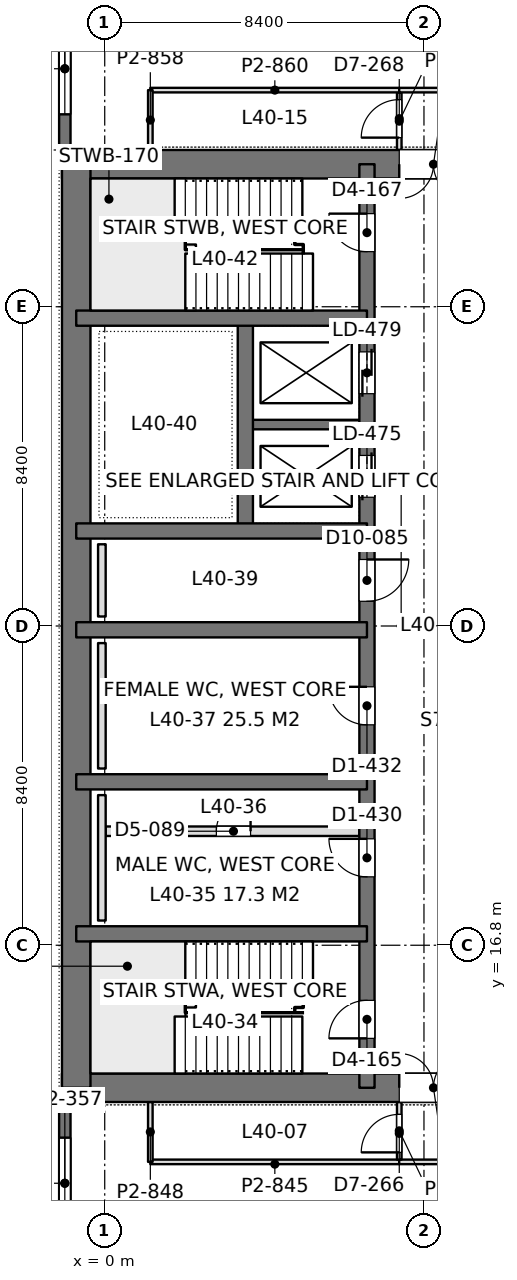
"""IFC4 building model, lengths in metres.
Left out: names, types, materials, properties, quantities, classifications, styles, units other than length and angle.
Written with IfcOpenShell. Run it as: python <this file> out.ifc"""

import sys

from ifc_helpers import new_model, si_unit, direction, frame, frame_2d, origin, place, context, subcontext, project, spatial, rectangle, extrude, element, fill, save


model = new_model("IFC4")
c1 = context("Model", 3, precision=1e-05, world=origin(), true_north=direction((0.0, 1.0)))
c2 = subcontext(c1, "Body", "Model", "MODEL_VIEW")
j1 = project(units=[si_unit("LENGTHUNIT", "METRE"), si_unit("PLANEANGLEUNIT", "RADIAN")], contexts=[c1])
p1 = place(None, origin())
s1 = spatial("IfcSite", under=j1, at=p1, CompositionType="ELEMENT")
p2 = place(p1, origin())
s2 = spatial("IfcBuilding", under=s1, at=p2, CompositionType="ELEMENT")
p3 = place(p2, frame((0.0, 0.0, 177.6)))
s3 = spatial("IfcBuildingStorey", under=s2, at=p3, CompositionType="ELEMENT", Elevation=177.6)
p4 = place(p3, frame((-1.125, 13.05, 0.0), z_axis=(0.0, 0.0, 1.0), x_axis=(1.0, 0.0, 0.0)))
e1 = element("IfcWall", 1, at=p4, inside=s3, PredefinedType="SHEAR", context=c2, shape_type="SweptSolid", body=[
    extrude(rectangle(XDim=17.85, YDim=0.75, at=frame_2d((8.925, 0.0))), origin(), (0.0, 0.0, 1.0), 4.2),
])
p5 = place(p4, frame((8.875, 0.0, 0.0)))
e2 = element("IfcOpeningElement", 2, at=p5, cuts=e1, PredefinedType="OPENING", context=c2, shape_type="SweptSolid", body=[
    extrude(rectangle(XDim=1.8, YDim=2.4, at=frame_2d((0.9, 1.2))), frame((0.0, 0.385, 0.0), z_axis=(0.0, -1.0, 0.0), x_axis=(1.0, 0.0, 0.0)), (0.0, 0.0, 1.0), 0.77),
])
p6 = place(p3, frame((-1.125, 37.35, 0.0), z_axis=(0.0, 0.0, 1.0), x_axis=(1.0, 0.0, 0.0)))
e3 = element("IfcWall", 3, at=p6, inside=s3, PredefinedType="SHEAR", context=c2, shape_type="SweptSolid", body=[
    extrude(rectangle(XDim=17.85, YDim=0.75, at=frame_2d((8.925, 0.0))), origin(), (0.0, 0.0, 1.0), 4.2),
])
p7 = place(p6, frame((8.875, 0.0, 0.0)))
e4 = element("IfcOpeningElement", 4, at=p7, cuts=e3, PredefinedType="OPENING", context=c2, shape_type="SweptSolid", body=[
    extrude(rectangle(XDim=1.8, YDim=2.4, at=frame_2d((0.9, 1.2))), frame((0.0, 0.385, 0.0), z_axis=(0.0, -1.0, 0.0), x_axis=(1.0, 0.0, 0.0)), (0.0, 0.0, 1.0), 0.77),
])
p8 = place(p3, frame((-0.75, 13.05, 0.0), z_axis=(0.0, 0.0, 1.0), x_axis=(0.0, 1.0, 0.0)))
e5 = element("IfcWall", 5, at=p8, inside=s3, PredefinedType="SHEAR", context=c2, shape_type="SweptSolid", body=[
    extrude(rectangle(XDim=24.3, YDim=0.75, at=frame_2d((12.15, 0.0))), origin(), (0.0, 0.0, 1.0), 4.2),
])
p9 = place(p3, frame((6.9, 13.05, 0.0), z_axis=(0.0, 0.0, 1.0), x_axis=(0.0, 1.0, 0.0)))
e6 = element("IfcWall", 6, at=p9, inside=s3, PredefinedType="SHEAR", context=c2, shape_type="SweptSolid", body=[
    extrude(rectangle(XDim=24.3, YDim=0.4, at=frame_2d((12.15, 0.0))), origin(), (0.0, 0.0, 1.0), 4.2),
])
p10 = place(p9, frame((1.3, 0.0, 0.0)))
e7 = element("IfcOpeningElement", 7, at=p10, cuts=e6, PredefinedType="OPENING", context=c2, shape_type="SweptSolid", body=[
    extrude(rectangle(XDim=1.0, YDim=2.2, at=frame_2d((0.5, 1.1))), frame((0.0, 0.21, 0.0), z_axis=(0.0, -1.0, 0.0), x_axis=(1.0, 0.0, 0.0)), (0.0, 0.0, 1.0), 0.42),
])
p11 = place(p9, frame((22.0, 0.0, 0.0)))
e8 = element("IfcOpeningElement", 8, at=p11, cuts=e6, PredefinedType="OPENING", context=c2, shape_type="SweptSolid", body=[
    extrude(rectangle(XDim=1.0, YDim=2.2, at=frame_2d((0.5, 1.1))), frame((0.0, 0.21, 0.0), z_axis=(0.0, -1.0, 0.0), x_axis=(1.0, 0.0, 0.0)), (0.0, 0.0, 1.0), 0.42),
])
p12 = place(p9, frame((5.55, 0.0, 0.0)))
e9 = element("IfcOpeningElement", 9, at=p12, cuts=e6, PredefinedType="OPENING", context=c2, shape_type="SweptSolid", body=[
    extrude(rectangle(XDim=1.0, YDim=2.2, at=frame_2d((0.5, 1.1))), frame((0.0, 0.21, 0.0), z_axis=(0.0, -1.0, 0.0), x_axis=(1.0, 0.0, 0.0)), (0.0, 0.0, 1.0), 0.42),
])
p13 = place(p9, frame((9.55, 0.0, 0.0)))
e10 = element("IfcOpeningElement", 10, at=p13, cuts=e6, PredefinedType="OPENING", context=c2, shape_type="SweptSolid", body=[
    extrude(rectangle(XDim=1.0, YDim=2.2, at=frame_2d((0.5, 1.1))), frame((0.0, 0.21, 0.0), z_axis=(0.0, -1.0, 0.0), x_axis=(1.0, 0.0, 0.0)), (0.0, 0.0, 1.0), 0.42),
])
p14 = place(p9, frame((12.8, 0.0, 0.0)))
e11 = element("IfcOpeningElement", 11, at=p14, cuts=e6, PredefinedType="OPENING", context=c2, shape_type="SweptSolid", body=[
    extrude(rectangle(XDim=1.1, YDim=2.2, at=frame_2d((0.55, 1.1))), frame((0.0, 0.21, 0.0), z_axis=(0.0, -1.0, 0.0), x_axis=(1.0, 0.0, 0.0)), (0.0, 0.0, 1.0), 0.42),
])
p15 = place(p9, frame((15.538, 0.0, 0.0)))
e12 = element("IfcOpeningElement", 12, at=p15, cuts=e6, PredefinedType="OPENING", context=c2, shape_type="SweptSolid", body=[
    extrude(rectangle(XDim=1.1, YDim=2.2, at=frame_2d((0.55, 1.1))), frame((0.0, 0.21, 0.0), z_axis=(0.0, -1.0, 0.0), x_axis=(1.0, 0.0, 0.0)), (0.0, 0.0, 1.0), 0.42),
])
p16 = place(p9, frame((18.262, 0.0, 0.0)))
e13 = element("IfcOpeningElement", 13, at=p16, cuts=e6, PredefinedType="OPENING", context=c2, shape_type="SweptSolid", body=[
    extrude(rectangle(XDim=1.1, YDim=2.2, at=frame_2d((0.55, 1.1))), frame((0.0, 0.21, 0.0), z_axis=(0.0, -1.0, 0.0), x_axis=(1.0, 0.0, 0.0)), (0.0, 0.0, 1.0), 0.42),
])
for number, where, z_axis, x_axis in (
    (14, (-0.75, 17.1, 0.0), (0.0, 0.0, 1.0), (1.0, 0.0, 0.0)),
    (15, (-0.75, 21.1, 0.0), (0.0, 0.0, 1.0), (1.0, 0.0, 0.0)),
    (16, (-0.75, 25.1, 0.0), (0.0, 0.0, 1.0), (1.0, 0.0, 0.0)),
    (17, (-0.75, 27.7, 0.0), (0.0, 0.0, 1.0), (1.0, 0.0, 0.0)),
    (18, (-0.75, 33.3, 0.0), (0.0, 0.0, 1.0), (1.0, 0.0, 0.0)),
):
    element("IfcWall", number, at=place(p3, frame(where, z_axis=z_axis, x_axis=x_axis)), inside=s3, PredefinedType="SHEAR", context=c2, shape_type="SweptSolid", body=[
        extrude(rectangle(XDim=7.65, YDim=0.4, at=frame_2d((3.825, 0.0))), origin(), (0.0, 0.0, 1.0), 4.2),
    ])
p17 = place(p3, frame((3.7, 27.7, 0.0), z_axis=(0.0, 0.0, 1.0), x_axis=(0.0, 1.0, 0.0)))
e19 = element("IfcWall", 19, at=p17, inside=s3, PredefinedType="SHEAR", context=c2, shape_type="SweptSolid", body=[
    extrude(rectangle(XDim=5.6, YDim=0.4, at=frame_2d((2.8, 0.0))), origin(), (0.0, 0.0, 1.0), 4.2),
])
p18 = place(p3, frame((3.7, 30.5, 0.0), z_axis=(0.0, 0.0, 1.0), x_axis=(1.0, 0.0, 0.0)))
e20 = element("IfcWall", 20, at=p18, inside=s3, PredefinedType="SHEAR", context=c2, shape_type="SweptSolid", body=[
    extrude(rectangle(XDim=3.2, YDim=0.25, at=frame_2d((1.6, 0.0))), origin(), (0.0, 0.0, 1.0), 4.2),
])
p19 = place(p3, frame((-1.05, 8.4, 0.0), z_axis=(0.0, 0.0, 1.0), x_axis=(0.0, 1.0, 0.0)))
e21 = element("IfcWall", 21, at=p19, inside=s3, PredefinedType="SOLIDWALL", context=c2, shape_type="SweptSolid", body=[
    extrude(rectangle(XDim=4.275, YDim=0.3, at=frame_2d((2.138, 0.0))), origin(), (0.0, 0.0, 1.0), 4.05),
])
p20 = place(p19, frame((0.938, 0.0, 0.9)))
e22 = element("IfcOpeningElement", 22, at=p20, cuts=e21, PredefinedType="OPENING", context=c2, shape_type="SweptSolid", body=[
    extrude(rectangle(XDim=2.4, YDim=1.9, at=frame_2d((1.2, 0.95))), frame((0.0, 0.16, 0.0), z_axis=(0.0, -1.0, 0.0), x_axis=(1.0, 0.0, 0.0)), (0.0, 0.0, 1.0), 0.32),
])
p21 = place(p3, frame((-1.05, 37.725, 0.0), z_axis=(0.0, 0.0, 1.0), x_axis=(0.0, 1.0, 0.0)))
e23 = element("IfcWall", 23, at=p21, inside=s3, PredefinedType="SOLIDWALL", context=c2, shape_type="SweptSolid", body=[
    extrude(rectangle(XDim=4.275, YDim=0.3, at=frame_2d((2.137, 0.0))), origin(), (0.0, 0.0, 1.0), 4.05),
])
p22 = place(p21, frame((0.938, 0.0, 0.9)))
e24 = element("IfcOpeningElement", 24, at=p22, cuts=e23, PredefinedType="OPENING", context=c2, shape_type="SweptSolid", body=[
    extrude(rectangle(XDim=2.4, YDim=1.9, at=frame_2d((1.2, 0.95))), frame((0.0, 0.16, 0.0), z_axis=(0.0, -1.0, 0.0), x_axis=(1.0, 0.0, 0.0)), (0.0, 0.0, 1.0), 0.32),
])
p23 = place(p3, frame((7.748, 11.1, 0.0), z_axis=(0.0, 0.0, 1.0), x_axis=(1.0, 0.0, 0.0)))
e25 = element("IfcWall", 25, at=p23, inside=s3, PredefinedType="PARTITIONING", context=c2, shape_type="SweptSolid", body=[
    extrude(rectangle(XDim=34.904, YDim=0.12, at=frame_2d((17.452, 0.0))), origin(), (0.0, 0.0, 1.0), 3.55),
])
p24 = place(p23, frame((10.735, 0.0, 0.0)))
e26 = element("IfcOpeningElement", 26, at=p24, cuts=e25, PredefinedType="OPENING", context=c2, shape_type="SweptSolid", body=[
    extrude(rectangle(XDim=1.8, YDim=2.2, at=frame_2d((0.9, 1.1))), frame((0.0, 0.07, 0.0), z_axis=(0.0, -1.0, 0.0), x_axis=(1.0, 0.0, 0.0)), (0.0, 0.0, 1.0), 0.14),
])
p25 = place(p23, frame((22.369, 0.0, 0.0)))
e27 = element("IfcOpeningElement", 27, at=p25, cuts=e25, PredefinedType="OPENING", context=c2, shape_type="SweptSolid", body=[
    extrude(rectangle(XDim=1.8, YDim=2.2, at=frame_2d((0.9, 1.1))), frame((0.0, 0.07, 0.0), z_axis=(0.0, -1.0, 0.0), x_axis=(1.0, 0.0, 0.0)), (0.0, 0.0, 1.0), 0.14),
])
p26 = place(p3, frame((7.75, 11.158, 0.0), z_axis=(0.0, 0.0, 1.0), x_axis=(0.0, 1.0, 0.0)))
e28 = element("IfcWall", 28, at=p26, inside=s3, PredefinedType="PARTITIONING", context=c2, shape_type="SweptSolid", body=[
    extrude(rectangle(XDim=1.518, YDim=0.12, at=frame_2d((0.759, 0.0))), origin(), (0.0, 0.0, 1.0), 4.05),
])
p27 = place(p26, frame((0.192, 0.0, 0.0)))
e29 = element("IfcOpeningElement", 29, at=p27, cuts=e28, PredefinedType="OPENING", context=c2, shape_type="SweptSolid", body=[
    extrude(rectangle(XDim=1.0, YDim=2.4, at=frame_2d((0.5, 1.2))), frame((0.0, 0.07, 0.0), z_axis=(0.0, -1.0, 0.0), x_axis=(1.0, 0.0, 0.0)), (0.0, 0.0, 1.0), 0.14),
])
p28 = place(p3, frame((1.2, 11.1, 0.0), z_axis=(0.0, 0.0, 1.0), x_axis=(1.0, 0.0, 0.0)))
e30 = element("IfcWall", 30, at=p28, inside=s3, PredefinedType="PARTITIONING", context=c2, shape_type="SweptSolid", body=[
    extrude(rectangle(XDim=6.552, YDim=0.12, at=frame_2d((3.276, 0.0))), origin(), (0.0, 0.0, 1.0), 4.05),
])
p29 = place(p3, frame((1.2, 11.1, 0.0), z_axis=(0.0, 0.0, 1.0), x_axis=(0.0, 1.0, 0.0)))
e31 = element("IfcWall", 31, at=p29, inside=s3, PredefinedType="PARTITIONING", context=c2, shape_type="SweptSolid", body=[
    extrude(rectangle(XDim=1.576, YDim=0.12, at=frame_2d((0.788, 0.0))), origin(), (0.0, 0.0, 1.0), 4.05),
])
p30 = place(p3, frame((7.748, 39.3, 0.0), z_axis=(0.0, 0.0, 1.0), x_axis=(1.0, 0.0, 0.0)))
e32 = element("IfcWall", 32, at=p30, inside=s3, PredefinedType="PARTITIONING", context=c2, shape_type="SweptSolid", body=[
    extrude(rectangle(XDim=34.904, YDim=0.12, at=frame_2d((17.452, 0.0))), origin(), (0.0, 0.0, 1.0), 3.55),
])
p31 = place(p30, frame((10.735, 0.0, 0.0)))
e33 = element("IfcOpeningElement", 33, at=p31, cuts=e32, PredefinedType="OPENING", context=c2, shape_type="SweptSolid", body=[
    extrude(rectangle(XDim=1.8, YDim=2.2, at=frame_2d((0.9, 1.1))), frame((0.0, 0.07, 0.0), z_axis=(0.0, -1.0, 0.0), x_axis=(1.0, 0.0, 0.0)), (0.0, 0.0, 1.0), 0.14),
])
p32 = place(p30, frame((22.369, 0.0, 0.0)))
e34 = element("IfcOpeningElement", 34, at=p32, cuts=e32, PredefinedType="OPENING", context=c2, shape_type="SweptSolid", body=[
    extrude(rectangle(XDim=1.8, YDim=2.2, at=frame_2d((0.9, 1.1))), frame((0.0, 0.07, 0.0), z_axis=(0.0, -1.0, 0.0), x_axis=(1.0, 0.0, 0.0)), (0.0, 0.0, 1.0), 0.14),
])
p33 = place(p3, frame((7.75, 37.724, 0.0), z_axis=(0.0, 0.0, 1.0), x_axis=(0.0, 1.0, 0.0)))
e35 = element("IfcWall", 35, at=p33, inside=s3, PredefinedType="PARTITIONING", context=c2, shape_type="SweptSolid", body=[
    extrude(rectangle(XDim=1.518, YDim=0.12, at=frame_2d((0.759, 0.0))), origin(), (0.0, 0.0, 1.0), 4.05),
])
p34 = place(p33, frame((0.326, 0.0, 0.0)))
e36 = element("IfcOpeningElement", 36, at=p34, cuts=e35, PredefinedType="OPENING", context=c2, shape_type="SweptSolid", body=[
    extrude(rectangle(XDim=1.0, YDim=2.4, at=frame_2d((0.5, 1.2))), frame((0.0, 0.07, 0.0), z_axis=(0.0, -1.0, 0.0), x_axis=(1.0, 0.0, 0.0)), (0.0, 0.0, 1.0), 0.14),
])
p35 = place(p3, frame((1.2, 39.3, 0.0), z_axis=(0.0, 0.0, 1.0), x_axis=(1.0, 0.0, 0.0)))
e37 = element("IfcWall", 37, at=p35, inside=s3, PredefinedType="PARTITIONING", context=c2, shape_type="SweptSolid", body=[
    extrude(rectangle(XDim=6.552, YDim=0.12, at=frame_2d((3.276, 0.0))), origin(), (0.0, 0.0, 1.0), 3.69),
])
p36 = place(p3, frame((1.2, 37.724, 0.0), z_axis=(0.0, 0.0, 1.0), x_axis=(0.0, 1.0, 0.0)))
e38 = element("IfcWall", 38, at=p36, inside=s3, PredefinedType="PARTITIONING", context=c2, shape_type="SweptSolid", body=[
    extrude(rectangle(XDim=1.576, YDim=0.12, at=frame_2d((0.788, 0.0))), origin(), (0.0, 0.0, 1.0), 4.05),
])
p37 = place(p3, frame((0.025, 19.8, 0.0), z_axis=(0.0, 0.0, 1.0), x_axis=(1.0, 0.0, 0.0)))
e39 = element("IfcWall", 39, at=p37, inside=s3, PredefinedType="PARTITIONING", context=c2, shape_type="SweptSolid", body=[
    extrude(rectangle(XDim=6.675, YDim=0.25, at=frame_2d((3.337, 0.0))), origin(), (0.0, 0.0, 1.0), 4.0),
])
p38 = place(p37, frame((2.913, 0.0, 0.0)))
e40 = element("IfcOpeningElement", 40, at=p38, cuts=e39, PredefinedType="OPENING", context=c2, shape_type="SweptSolid", body=[
    extrude(rectangle(XDim=0.9, YDim=2.2, at=frame_2d((0.45, 1.1))), frame((0.0, 0.135, 0.0), z_axis=(0.0, -1.0, 0.0), x_axis=(1.0, 0.0, 0.0)), (0.0, 0.0, 1.0), 0.27),
])
for number, where, z_axis, x_axis in (
    (41, (-0.075, 17.45, 0.0), (0.0, 0.0, 1.0), (0.0, 1.0, 0.0)),
    (42, (-0.075, 21.45, 0.0), (0.0, 0.0, 1.0), (0.0, 1.0, 0.0)),
):
    element("IfcWall", number, at=place(p3, frame(where, z_axis=z_axis, x_axis=x_axis)), inside=s3, PredefinedType="PLUMBINGWALL", context=c2, shape_type="SweptSolid", body=[
        extrude(rectangle(XDim=3.3, YDim=0.2, at=frame_2d((1.65, 0.0))), origin(), (0.0, 0.0, 1.0), 1.2),
    ])
p39 = place(p3, frame((-0.075, 25.45, 0.0), z_axis=(0.0, 0.0, 1.0), x_axis=(0.0, 1.0, 0.0)))
e43 = element("IfcWall", 43, at=p39, inside=s3, PredefinedType="PLUMBINGWALL", context=c2, shape_type="SweptSolid", body=[
    extrude(rectangle(XDim=1.9, YDim=0.2, at=frame_2d((0.95, 0.0))), origin(), (0.0, 0.0, 1.0), 1.2),
])
p40 = place(p20, origin())
e44 = element("IfcWindow", 44, at=p40, inside=s3, PartitioningType="SINGLE_PANEL", PredefinedType="WINDOW", context=c2, shape_type="SweptSolid", body=[
    extrude(rectangle(XDim=2.4, YDim=1.9, at=frame_2d((1.2, 0.95))), frame((0.0, 0.03, 0.0), z_axis=(0.0, -1.0, 0.0), x_axis=(1.0, 0.0, 0.0)), (0.0, 0.0, 1.0), 0.06),
])
fill(e22, e44)
p41 = place(p22, origin())
e45 = element("IfcWindow", 45, at=p41, inside=s3, PartitioningType="SINGLE_PANEL", PredefinedType="WINDOW", context=c2, shape_type="SweptSolid", body=[
    extrude(rectangle(XDim=2.4, YDim=1.9, at=frame_2d((1.2, 0.95))), frame((0.0, 0.03, 0.0), z_axis=(0.0, -1.0, 0.0), x_axis=(1.0, 0.0, 0.0)), (0.0, 0.0, 1.0), 0.06),
])
fill(e24, e45)
p42 = place(p5, origin())
e46 = element("IfcDoor", 46, at=p42, inside=s3, OperationType="DOUBLE_DOOR_SINGLE_SWING", PredefinedType="DOOR", context=c2, shape_type="SweptSolid", body=[
    extrude(rectangle(XDim=1.8, YDim=2.4, at=frame_2d((0.9, 1.2))), frame((0.0, 0.025, 0.0), z_axis=(0.0, -1.0, 0.0), x_axis=(1.0, 0.0, 0.0)), (0.0, 0.0, 1.0), 0.05),
])
fill(e2, e46)
p43 = place(p7, frame((1.8, 0.0, 0.0), z_axis=(0.0, 0.0, 1.0), x_axis=(-1.0, 0.0, 0.0)))
e47 = element("IfcDoor", 47, at=p43, inside=s3, OperationType="DOUBLE_DOOR_SINGLE_SWING", PredefinedType="DOOR", context=c2, shape_type="SweptSolid", body=[
    extrude(rectangle(XDim=1.8, YDim=2.4, at=frame_2d((0.9, 1.2))), frame((0.0, 0.025, 0.0), z_axis=(0.0, -1.0, 0.0), x_axis=(1.0, 0.0, 0.0)), (0.0, 0.0, 1.0), 0.05),
])
fill(e4, e47)
p44 = place(p10, origin())
e48 = element("IfcDoor", 48, at=p44, inside=s3, OperationType="SINGLE_SWING_LEFT", PredefinedType="DOOR", context=c2, shape_type="SweptSolid", body=[
    extrude(rectangle(XDim=1.0, YDim=2.2, at=frame_2d((0.5, 1.1))), frame((0.0, 0.025, 0.0), z_axis=(0.0, -1.0, 0.0), x_axis=(1.0, 0.0, 0.0)), (0.0, 0.0, 1.0), 0.05),
])
fill(e7, e48)
p45 = place(p11, origin())
e49 = element("IfcDoor", 49, at=p45, inside=s3, OperationType="SINGLE_SWING_RIGHT", PredefinedType="DOOR", context=c2, shape_type="SweptSolid", body=[
    extrude(rectangle(XDim=1.0, YDim=2.2, at=frame_2d((0.5, 1.1))), frame((0.0, 0.025, 0.0), z_axis=(0.0, -1.0, 0.0), x_axis=(1.0, 0.0, 0.0)), (0.0, 0.0, 1.0), 0.05),
])
fill(e8, e49)
p46 = place(p12, origin())
e50 = element("IfcDoor", 50, at=p46, inside=s3, OperationType="SINGLE_SWING_RIGHT", PredefinedType="DOOR", context=c2, shape_type="SweptSolid", body=[
    extrude(rectangle(XDim=1.0, YDim=2.2, at=frame_2d((0.5, 1.1))), frame((0.0, 0.025, 0.0), z_axis=(0.0, -1.0, 0.0), x_axis=(1.0, 0.0, 0.0)), (0.0, 0.0, 1.0), 0.05),
])
fill(e9, e50)
p47 = place(p13, origin())
e51 = element("IfcDoor", 51, at=p47, inside=s3, OperationType="SINGLE_SWING_RIGHT", PredefinedType="DOOR", context=c2, shape_type="SweptSolid", body=[
    extrude(rectangle(XDim=1.0, YDim=2.2, at=frame_2d((0.5, 1.1))), frame((0.0, 0.025, 0.0), z_axis=(0.0, -1.0, 0.0), x_axis=(1.0, 0.0, 0.0)), (0.0, 0.0, 1.0), 0.05),
])
fill(e10, e51)
p48 = place(p14, frame((1.1, 0.0, 0.0), z_axis=(0.0, 0.0, 1.0), x_axis=(-1.0, 0.0, 0.0)))
e52 = element("IfcDoor", 52, at=p48, inside=s3, OperationType="SINGLE_SWING_LEFT", PredefinedType="DOOR", context=c2, shape_type="SweptSolid", body=[
    extrude(rectangle(XDim=1.1, YDim=2.2, at=frame_2d((0.55, 1.1))), frame((0.0, 0.025, 0.0), z_axis=(0.0, -1.0, 0.0), x_axis=(1.0, 0.0, 0.0)), (0.0, 0.0, 1.0), 0.05),
])
fill(e11, e52)
p49 = place(p15, origin())
e53 = element("IfcDoor", 53, at=p49, inside=s3, OperationType="DOUBLE_DOOR_SLIDING", PredefinedType="DOOR", context=c2, shape_type="SweptSolid", body=[
    extrude(rectangle(XDim=1.1, YDim=2.2, at=frame_2d((0.55, 1.1))), frame((0.0, 0.025, 0.0), z_axis=(0.0, -1.0, 0.0), x_axis=(1.0, 0.0, 0.0)), (0.0, 0.0, 1.0), 0.05),
])
fill(e12, e53)
p50 = place(p16, origin())
e54 = element("IfcDoor", 54, at=p50, inside=s3, OperationType="DOUBLE_DOOR_SLIDING", PredefinedType="DOOR", context=c2, shape_type="SweptSolid", body=[
    extrude(rectangle(XDim=1.1, YDim=2.2, at=frame_2d((0.55, 1.1))), frame((0.0, 0.025, 0.0), z_axis=(0.0, -1.0, 0.0), x_axis=(1.0, 0.0, 0.0)), (0.0, 0.0, 1.0), 0.05),
])
fill(e13, e54)
p51 = place(p27, origin())
e55 = element("IfcDoor", 55, at=p51, inside=s3, OperationType="SINGLE_SWING_LEFT", PredefinedType="DOOR", context=c2, shape_type="SweptSolid", body=[
    extrude(rectangle(XDim=1.0, YDim=2.4, at=frame_2d((0.5, 1.2))), frame((0.0, 0.025, 0.0), z_axis=(0.0, -1.0, 0.0), x_axis=(1.0, 0.0, 0.0)), (0.0, 0.0, 1.0), 0.05),
])
fill(e29, e55)
p52 = place(p34, origin())
e56 = element("IfcDoor", 56, at=p52, inside=s3, OperationType="SINGLE_SWING_LEFT", PredefinedType="DOOR", context=c2, shape_type="SweptSolid", body=[
    extrude(rectangle(XDim=1.0, YDim=2.4, at=frame_2d((0.5, 1.2))), frame((0.0, 0.025, 0.0), z_axis=(0.0, -1.0, 0.0), x_axis=(1.0, 0.0, 0.0)), (0.0, 0.0, 1.0), 0.05),
])
fill(e36, e56)
p53 = place(p38, origin())
e57 = element("IfcDoor", 57, at=p53, inside=s3, OperationType="SINGLE_SWING_RIGHT", PredefinedType="DOOR", context=c2, shape_type="SweptSolid", body=[
    extrude(rectangle(XDim=0.9, YDim=2.2, at=frame_2d((0.45, 1.1))), frame((0.0, 0.025, 0.0), z_axis=(0.0, -1.0, 0.0), x_axis=(1.0, 0.0, 0.0)), (0.0, 0.0, 1.0), 0.05),
])
fill(e40, e57)
save(model, sys.argv[1])
